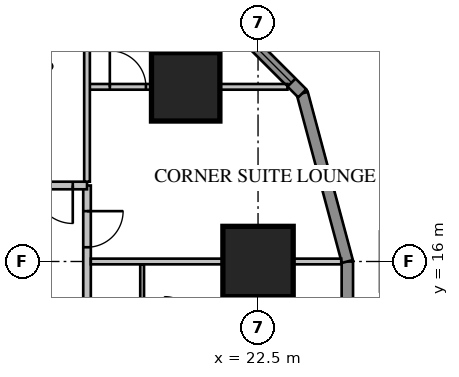
"""IFC4 building model, lengths in metres.
Left out: names, types, materials, properties, quantities, classifications, styles, units other than length and angle.
Written with IfcOpenShell. Run it as: python <this file> out.ifc"""

import sys

from ifc_helpers import new_model, si_unit, direction, frame, frame_2d, origin, origin_2d, place, context, subcontext, project, spatial, rectangle, extrude, element, fill, save


model = new_model("IFC4")
c1 = context("Model", 3, precision=1e-05, world=origin(), true_north=direction((0.0, 1.0)))
c2 = subcontext(c1, "Body", "Model", "MODEL_VIEW")
j1 = project(units=[si_unit("LENGTHUNIT", "METRE"), si_unit("PLANEANGLEUNIT", "RADIAN")], contexts=[c1])
p1 = place(None, origin())
s1 = spatial("IfcSite", under=j1, at=p1, CompositionType="ELEMENT")
p2 = place(p1, origin())
s2 = spatial("IfcBuilding", under=s1, at=p2, CompositionType="ELEMENT")
p3 = place(p2, frame((0.0, 0.0, 50.65)))
s3 = spatial("IfcBuildingStorey", under=s2, at=p3, CompositionType="ELEMENT", Elevation=50.65)
p4 = place(p3, frame((22.5, 16.0, 0.0), z_axis=(0.0, 0.0, 1.0), x_axis=(1.0, 0.0, 0.0)))
e1 = element("IfcColumn", 1, at=p4, inside=s3, PredefinedType="COLUMN", context=c2, shape_type="SweptSolid", body=[
    extrude(rectangle(XDim=1.85, YDim=1.85, at=origin_2d()), origin(), (0.0, 0.0, 1.0), 3.413),
])
p5 = place(p3, frame((20.596, 20.596, 0.0), z_axis=(0.0, 0.0, 1.0), x_axis=(1.0, 0.0, 0.0)))
e2 = element("IfcColumn", 2, at=p5, inside=s3, PredefinedType="COLUMN", context=c2, shape_type="SweptSolid", body=[
    extrude(rectangle(XDim=1.8, YDim=1.8, at=origin_2d()), origin(), (0.0, 0.0, 1.0), 3.413),
])
p6 = place(p3, frame((24.85, -16.0, 0.0), z_axis=(0.0, 0.0, 1.0), x_axis=(0.0, 1.0, 0.0)))
e3 = element("IfcWall", 3, at=p6, inside=s3, PredefinedType="SOLIDWALL", context=c2, shape_type="SweptSolid", body=[
    extrude(rectangle(XDim=32.0, YDim=0.3, at=frame_2d((16.0, 0.0))), origin(), (0.0, 0.0, 1.0), 3.65),
])
p7 = place(p6, frame((1.2, 0.0, 0.75)))
e4 = element("IfcOpeningElement", 4, at=p7, cuts=e3, PredefinedType="OPENING", context=c2, shape_type="SweptSolid", body=[
    extrude(rectangle(XDim=1.6, YDim=1.8, at=frame_2d((0.8, 0.9))), frame((0.0, 0.17, 0.0), z_axis=(0.0, -1.0, 0.0), x_axis=(1.0, 0.0, 0.0)), (0.0, 0.0, 1.0), 0.34),
])
p8 = place(p6, frame((5.2, 0.0, 0.75)))
e5 = element("IfcOpeningElement", 5, at=p8, cuts=e3, PredefinedType="OPENING", context=c2, shape_type="SweptSolid", body=[
    extrude(rectangle(XDim=1.6, YDim=1.8, at=frame_2d((0.8, 0.9))), frame((0.0, 0.17, 0.0), z_axis=(0.0, -1.0, 0.0), x_axis=(1.0, 0.0, 0.0)), (0.0, 0.0, 1.0), 0.34),
])
p9 = place(p6, frame((17.2, 0.0, 0.75)))
e6 = element("IfcOpeningElement", 6, at=p9, cuts=e3, PredefinedType="OPENING", context=c2, shape_type="SweptSolid", body=[
    extrude(rectangle(XDim=1.6, YDim=1.8, at=frame_2d((0.8, 0.9))), frame((0.0, 0.17, 0.0), z_axis=(0.0, -1.0, 0.0), x_axis=(1.0, 0.0, 0.0)), (0.0, 0.0, 1.0), 0.34),
])
p10 = place(p6, frame((21.2, 0.0, 0.75)))
e7 = element("IfcOpeningElement", 7, at=p10, cuts=e3, PredefinedType="OPENING", context=c2, shape_type="SweptSolid", body=[
    extrude(rectangle(XDim=1.6, YDim=1.8, at=frame_2d((0.8, 0.9))), frame((0.0, 0.17, 0.0), z_axis=(0.0, -1.0, 0.0), x_axis=(1.0, 0.0, 0.0)), (0.0, 0.0, 1.0), 0.34),
])
p11 = place(p6, frame((25.2, 0.0, 0.75)))
e8 = element("IfcOpeningElement", 8, at=p11, cuts=e3, PredefinedType="OPENING", context=c2, shape_type="SweptSolid", body=[
    extrude(rectangle(XDim=1.6, YDim=1.8, at=frame_2d((0.8, 0.9))), frame((0.0, 0.17, 0.0), z_axis=(0.0, -1.0, 0.0), x_axis=(1.0, 0.0, 0.0)), (0.0, 0.0, 1.0), 0.34),
])
p12 = place(p6, frame((29.2, 0.0, 0.75)))
e9 = element("IfcOpeningElement", 9, at=p12, cuts=e3, PredefinedType="OPENING", context=c2, shape_type="SweptSolid", body=[
    extrude(rectangle(XDim=1.6, YDim=1.8, at=frame_2d((0.8, 0.9))), frame((0.0, 0.17, 0.0), z_axis=(0.0, -1.0, 0.0), x_axis=(1.0, 0.0, 0.0)), (0.0, 0.0, 1.0), 0.34),
])
p13 = place(p6, frame((8.8, 0.0, 0.75)))
e10 = element("IfcOpeningElement", 10, at=p13, cuts=e3, PredefinedType="OPENING", context=c2, shape_type="SweptSolid", body=[
    extrude(rectangle(XDim=2.4, YDim=1.8, at=frame_2d((1.2, 0.9))), frame((0.0, 0.17, 0.0), z_axis=(0.0, -1.0, 0.0), x_axis=(1.0, 0.0, 0.0)), (0.0, 0.0, 1.0), 0.34),
])
p14 = place(p6, frame((13.812, 0.0, 0.0)))
e11 = element("IfcOpeningElement", 11, at=p14, cuts=e3, PredefinedType="OPENING", context=c2, shape_type="SweptSolid", body=[
    extrude(rectangle(XDim=1.0, YDim=2.4, at=frame_2d((0.5, 1.2))), frame((0.0, 0.17, 0.0), z_axis=(0.0, -1.0, 0.0), x_axis=(1.0, 0.0, 0.0)), (0.0, 0.0, 1.0), 0.34),
])
p15 = place(p3, frame((24.85, 16.0, 0.0), z_axis=(0.0, 0.0, 1.0), x_axis=(-0.258839972501, 0.965920218567, 0.0)))
e12 = element("IfcWall", 12, at=p15, inside=s3, PredefinedType="SOLIDWALL", context=c2, shape_type="SweptSolid", body=[
    extrude(rectangle(XDim=4.581, YDim=0.3, at=frame_2d((2.291, 0.0))), origin(), (0.0, 0.0, 1.0), 3.65),
])
p16 = place(p3, frame((23.664, 20.425, 0.0), z_axis=(0.0, 0.0, 1.0), x_axis=(-0.707106781187, 0.707106781187, 0.0)))
e13 = element("IfcWall", 13, at=p16, inside=s3, PredefinedType="SOLIDWALL", context=c2, shape_type="SweptSolid", body=[
    extrude(rectangle(XDim=4.581, YDim=0.3, at=frame_2d((2.291, 0.0))), origin(), (0.0, 0.0, 1.0), 3.65),
])
p17 = place(p16, frame((0.4, 0.0, 0.75)))
e14 = element("IfcOpeningElement", 14, at=p17, cuts=e13, PredefinedType="OPENING", context=c2, shape_type="SweptSolid", body=[
    extrude(rectangle(XDim=3.781, YDim=1.8, at=frame_2d((1.891, 0.9))), frame((0.0, 0.17, 0.0), z_axis=(0.0, -1.0, 0.0), x_axis=(1.0, 0.0, 0.0)), (0.0, 0.0, 1.0), 0.34),
])
p18 = place(p3, frame((18.0, -18.0, 0.0), z_axis=(0.0, 0.0, 1.0), x_axis=(0.0, 1.0, 0.0)))
e15 = element("IfcWall", 15, at=p18, inside=s3, PredefinedType="PARTITIONING", context=c2, shape_type="SweptSolid", body=[
    extrude(rectangle(XDim=36.0, YDim=0.2, at=frame_2d((18.0, 0.0))), origin(), (0.0, 0.0, 1.0), 3.65),
])
p19 = place(p18, frame((10.4, 0.0, 0.0)))
e16 = element("IfcOpeningElement", 16, at=p19, cuts=e15, PredefinedType="OPENING", context=c2, shape_type="SweptSolid", body=[
    extrude(rectangle(XDim=1.0, YDim=2.1, at=frame_2d((0.5, 1.05))), frame((0.0, 0.12, 0.0), z_axis=(0.0, -1.0, 0.0), x_axis=(1.0, 0.0, 0.0)), (0.0, 0.0, 1.0), 0.24),
])
p20 = place(p18, frame((14.4, 0.0, 0.0)))
e17 = element("IfcOpeningElement", 17, at=p20, cuts=e15, PredefinedType="OPENING", context=c2, shape_type="SweptSolid", body=[
    extrude(rectangle(XDim=1.0, YDim=2.1, at=frame_2d((0.5, 1.05))), frame((0.0, 0.12, 0.0), z_axis=(0.0, -1.0, 0.0), x_axis=(1.0, 0.0, 0.0)), (0.0, 0.0, 1.0), 0.24),
])
p21 = place(p18, frame((0.375, 0.0, 0.0)))
e18 = element("IfcOpeningElement", 18, at=p21, cuts=e15, PredefinedType="OPENING", context=c2, shape_type="SweptSolid", body=[
    extrude(rectangle(XDim=1.0, YDim=2.1, at=frame_2d((0.5, 1.05))), frame((0.0, 0.12, 0.0), z_axis=(0.0, -1.0, 0.0), x_axis=(1.0, 0.0, 0.0)), (0.0, 0.0, 1.0), 0.24),
])
p22 = place(p18, frame((34.375, 0.0, 0.0)))
e19 = element("IfcOpeningElement", 19, at=p22, cuts=e15, PredefinedType="OPENING", context=c2, shape_type="SweptSolid", body=[
    extrude(rectangle(XDim=0.95, YDim=2.1, at=frame_2d((0.475, 1.05))), frame((0.0, 0.12, 0.0), z_axis=(0.0, -1.0, 0.0), x_axis=(1.0, 0.0, 0.0)), (0.0, 0.0, 1.0), 0.24),
])
p23 = place(p3, frame((19.45, -3.925, 0.0), z_axis=(0.0, 0.0, 1.0), x_axis=(0.0, 1.0, 0.0)))
e20 = element("IfcWall", 20, at=p23, inside=s3, PredefinedType="PARTITIONING", context=c2, shape_type="SweptSolid", body=[
    extrude(rectangle(XDim=19.85, YDim=0.1, at=frame_2d((9.925, 0.0))), origin(), (0.0, 0.0, 1.0), 3.65),
])
p24 = place(p23, frame((2.125, 0.0, 0.0)))
e21 = element("IfcOpeningElement", 21, at=p24, cuts=e20, PredefinedType="OPENING", context=c2, shape_type="SweptSolid", body=[
    extrude(rectangle(XDim=1.0, YDim=2.1, at=frame_2d((0.5, 1.05))), frame((0.0, 0.07, 0.0), z_axis=(0.0, -1.0, 0.0), x_axis=(1.0, 0.0, 0.0)), (0.0, 0.0, 1.0), 0.14),
])
p25 = place(p23, frame((0.3, 0.0, 0.0)))
e22 = element("IfcOpeningElement", 22, at=p25, cuts=e20, PredefinedType="OPENING", context=c2, shape_type="SweptSolid", body=[
    extrude(rectangle(XDim=0.8, YDim=2.1, at=frame_2d((0.4, 1.05))), frame((0.0, 0.07, 0.0), z_axis=(0.0, -1.0, 0.0), x_axis=(1.0, 0.0, 0.0)), (0.0, 0.0, 1.0), 0.14),
])
p26 = place(p23, frame((4.3, 0.0, 0.0)))
e23 = element("IfcOpeningElement", 23, at=p26, cuts=e20, PredefinedType="OPENING", context=c2, shape_type="SweptSolid", body=[
    extrude(rectangle(XDim=0.95, YDim=2.1, at=frame_2d((0.475, 1.05))), frame((0.0, 0.07, 0.0), z_axis=(0.0, -1.0, 0.0), x_axis=(1.0, 0.0, 0.0)), (0.0, 0.0, 1.0), 0.14),
])
p27 = place(p23, frame((8.3, 0.0, 0.0)))
e24 = element("IfcOpeningElement", 24, at=p27, cuts=e20, PredefinedType="OPENING", context=c2, shape_type="SweptSolid", body=[
    extrude(rectangle(XDim=0.95, YDim=2.1, at=frame_2d((0.475, 1.05))), frame((0.0, 0.07, 0.0), z_axis=(0.0, -1.0, 0.0), x_axis=(1.0, 0.0, 0.0)), (0.0, 0.0, 1.0), 0.14),
])
p28 = place(p23, frame((12.3, 0.0, 0.0)))
e25 = element("IfcOpeningElement", 25, at=p28, cuts=e20, PredefinedType="OPENING", context=c2, shape_type="SweptSolid", body=[
    extrude(rectangle(XDim=0.95, YDim=2.1, at=frame_2d((0.475, 1.05))), frame((0.0, 0.07, 0.0), z_axis=(0.0, -1.0, 0.0), x_axis=(1.0, 0.0, 0.0)), (0.0, 0.0, 1.0), 0.14),
])
p29 = place(p23, frame((16.3, 0.0, 0.0)))
e26 = element("IfcOpeningElement", 26, at=p29, cuts=e20, PredefinedType="OPENING", context=c2, shape_type="SweptSolid", body=[
    extrude(rectangle(XDim=0.95, YDim=2.1, at=frame_2d((0.475, 1.05))), frame((0.0, 0.07, 0.0), z_axis=(0.0, -1.0, 0.0), x_axis=(1.0, 0.0, 0.0)), (0.0, 0.0, 1.0), 0.14),
])
p30 = place(p3, frame((18.1, 16.0, 0.0), z_axis=(0.0, 0.0, 1.0), x_axis=(1.0, 0.0, 0.0)))
e27 = element("IfcWall", 27, at=p30, inside=s3, PredefinedType="PARTITIONING", context=c2, shape_type="SweptSolid", body=[
    extrude(rectangle(XDim=6.589, YDim=0.15, at=frame_2d((3.295, 0.0))), origin(), (0.0, 0.0, 1.0), 3.65),
])
p31 = place(p3, frame((21.95, 14.325, 0.0), z_axis=(0.0, 0.0, 1.0), x_axis=(0.0, 1.0, 0.0)))
e28 = element("IfcWall", 28, at=p31, inside=s3, PredefinedType="PARTITIONING", context=c2, shape_type="SweptSolid", body=[
    extrude(rectangle(XDim=1.6, YDim=0.1, at=frame_2d((0.8, 0.0))), origin(), (0.0, 0.0, 1.0), 3.65),
])
p32 = place(p3, frame((18.065, 20.596, 0.0), z_axis=(0.0, 0.0, 1.0), x_axis=(1.0, 0.0, 0.0)))
e29 = element("IfcWall", 29, at=p32, inside=s3, PredefinedType="PARTITIONING", context=c2, shape_type="SweptSolid", body=[
    extrude(rectangle(XDim=5.209, YDim=0.15, at=frame_2d((2.604, 0.0))), origin(), (0.0, 0.0, 1.0), 3.65),
])
p33 = place(p32, frame((0.535, 0.0, 0.0)))
e30 = element("IfcOpeningElement", 30, at=p33, cuts=e29, PredefinedType="OPENING", context=c2, shape_type="SweptSolid", body=[
    extrude(rectangle(XDim=0.95, YDim=2.1, at=frame_2d((0.475, 1.05))), frame((0.0, 0.095, 0.0), z_axis=(0.0, -1.0, 0.0), x_axis=(1.0, 0.0, 0.0)), (0.0, 0.0, 1.0), 0.19),
])
p34 = place(p3, frame((18.0, 18.0, 0.0), z_axis=(0.0, 0.0, 1.0), x_axis=(-1.0, 0.0, 0.0)))
e31 = element("IfcWall", 31, at=p34, inside=s3, PredefinedType="PARTITIONING", context=c2, shape_type="SweptSolid", body=[
    extrude(rectangle(XDim=36.0, YDim=0.2, at=frame_2d((18.0, 0.0))), origin(), (0.0, 0.0, 1.0), 3.65),
])
p35 = place(p34, frame((0.375, 0.0, 0.0)))
e32 = element("IfcOpeningElement", 32, at=p35, cuts=e31, PredefinedType="OPENING", context=c2, shape_type="SweptSolid", body=[
    extrude(rectangle(XDim=1.0, YDim=2.1, at=frame_2d((0.5, 1.05))), frame((0.0, 0.12, 0.0), z_axis=(0.0, -1.0, 0.0), x_axis=(1.0, 0.0, 0.0)), (0.0, 0.0, 1.0), 0.24),
])
p36 = place(p34, frame((3.95, 0.0, 0.0)))
e33 = element("IfcOpeningElement", 33, at=p36, cuts=e31, PredefinedType="OPENING", context=c2, shape_type="SweptSolid", body=[
    extrude(rectangle(XDim=0.95, YDim=2.1, at=frame_2d((0.475, 1.05))), frame((0.0, 0.12, 0.0), z_axis=(0.0, -1.0, 0.0), x_axis=(1.0, 0.0, 0.0)), (0.0, 0.0, 1.0), 0.24),
])
p37 = place(p34, frame((7.95, 0.0, 0.0)))
e34 = element("IfcOpeningElement", 34, at=p37, cuts=e31, PredefinedType="OPENING", context=c2, shape_type="SweptSolid", body=[
    extrude(rectangle(XDim=0.95, YDim=2.1, at=frame_2d((0.475, 1.05))), frame((0.0, 0.12, 0.0), z_axis=(0.0, -1.0, 0.0), x_axis=(1.0, 0.0, 0.0)), (0.0, 0.0, 1.0), 0.24),
])
p38 = place(p34, frame((19.95, 0.0, 0.0)))
e35 = element("IfcOpeningElement", 35, at=p38, cuts=e31, PredefinedType="OPENING", context=c2, shape_type="SweptSolid", body=[
    extrude(rectangle(XDim=0.95, YDim=2.1, at=frame_2d((0.475, 1.05))), frame((0.0, 0.12, 0.0), z_axis=(0.0, -1.0, 0.0), x_axis=(1.0, 0.0, 0.0)), (0.0, 0.0, 1.0), 0.24),
])
p39 = place(p34, frame((23.95, 0.0, 0.0)))
e36 = element("IfcOpeningElement", 36, at=p39, cuts=e31, PredefinedType="OPENING", context=c2, shape_type="SweptSolid", body=[
    extrude(rectangle(XDim=0.95, YDim=2.1, at=frame_2d((0.475, 1.05))), frame((0.0, 0.12, 0.0), z_axis=(0.0, -1.0, 0.0), x_axis=(1.0, 0.0, 0.0)), (0.0, 0.0, 1.0), 0.24),
])
p40 = place(p34, frame((27.95, 0.0, 0.0)))
e37 = element("IfcOpeningElement", 37, at=p40, cuts=e31, PredefinedType="OPENING", context=c2, shape_type="SweptSolid", body=[
    extrude(rectangle(XDim=0.95, YDim=2.1, at=frame_2d((0.475, 1.05))), frame((0.0, 0.12, 0.0), z_axis=(0.0, -1.0, 0.0), x_axis=(1.0, 0.0, 0.0)), (0.0, 0.0, 1.0), 0.24),
])
p41 = place(p34, frame((31.95, 0.0, 0.0)))
e38 = element("IfcOpeningElement", 38, at=p41, cuts=e31, PredefinedType="OPENING", context=c2, shape_type="SweptSolid", body=[
    extrude(rectangle(XDim=0.95, YDim=2.1, at=frame_2d((0.475, 1.05))), frame((0.0, 0.12, 0.0), z_axis=(0.0, -1.0, 0.0), x_axis=(1.0, 0.0, 0.0)), (0.0, 0.0, 1.0), 0.24),
])
p42 = place(p34, frame((34.375, 0.0, 0.0)))
e39 = element("IfcOpeningElement", 39, at=p42, cuts=e31, PredefinedType="OPENING", context=c2, shape_type="SweptSolid", body=[
    extrude(rectangle(XDim=0.95, YDim=2.1, at=frame_2d((0.475, 1.05))), frame((0.0, 0.12, 0.0), z_axis=(0.0, -1.0, 0.0), x_axis=(1.0, 0.0, 0.0)), (0.0, 0.0, 1.0), 0.24),
])
p43 = place(p34, frame((11.2, 0.0, 0.0)))
e40 = element("IfcOpeningElement", 40, at=p43, cuts=e31, PredefinedType="OPENING", context=c2, shape_type="SweptSolid", body=[
    extrude(rectangle(XDim=1.0, YDim=2.1, at=frame_2d((0.5, 1.05))), frame((0.0, 0.12, 0.0), z_axis=(0.0, -1.0, 0.0), x_axis=(1.0, 0.0, 0.0)), (0.0, 0.0, 1.0), 0.24),
])
p44 = place(p34, frame((15.2, 0.0, 0.0)))
e41 = element("IfcOpeningElement", 41, at=p44, cuts=e31, PredefinedType="OPENING", context=c2, shape_type="SweptSolid", body=[
    extrude(rectangle(XDim=1.0, YDim=2.1, at=frame_2d((0.5, 1.05))), frame((0.0, 0.12, 0.0), z_axis=(0.0, -1.0, 0.0), x_axis=(1.0, 0.0, 0.0)), (0.0, 0.0, 1.0), 0.24),
])
p45 = place(p3, frame((18.0, 18.1, 0.0), z_axis=(0.0, 0.0, 1.0), x_axis=(0.0, 1.0, 0.0)))
e42 = element("IfcWall", 42, at=p45, inside=s3, PredefinedType="PARTITIONING", context=c2, shape_type="SweptSolid", body=[
    extrude(rectangle(XDim=6.053, YDim=0.15, at=frame_2d((3.027, 0.0))), origin(), (0.0, 0.0, 1.0), 3.65),
])
p46 = place(p17, origin())
e43 = element("IfcWindow", 43, at=p46, inside=s3, PartitioningType="SINGLE_PANEL", PredefinedType="WINDOW", context=c2, shape_type="SweptSolid", body=[
    extrude(rectangle(XDim=3.781, YDim=1.8, at=frame_2d((1.891, 0.9))), frame((0.0, 0.03, 0.0), z_axis=(0.0, -1.0, 0.0), x_axis=(1.0, 0.0, 0.0)), (0.0, 0.0, 1.0), 0.06),
])
fill(e14, e43)
p47 = place(p22, origin())
e44 = element("IfcDoor", 44, at=p47, inside=s3, OperationType="SINGLE_SWING_RIGHT", PredefinedType="DOOR", context=c2, shape_type="SweptSolid", body=[
    extrude(rectangle(XDim=0.95, YDim=2.1, at=frame_2d((0.475, 1.05))), frame((0.0, 0.025, 0.0), z_axis=(0.0, -1.0, 0.0), x_axis=(1.0, 0.0, 0.0)), (0.0, 0.0, 1.0), 0.05),
])
fill(e19, e44)
p48 = place(p33, origin())
e45 = element("IfcDoor", 45, at=p48, inside=s3, OperationType="SINGLE_SWING_LEFT", PredefinedType="DOOR", context=c2, shape_type="SweptSolid", body=[
    extrude(rectangle(XDim=0.95, YDim=2.1, at=frame_2d((0.475, 1.05))), frame((0.0, 0.025, 0.0), z_axis=(0.0, -1.0, 0.0), x_axis=(1.0, 0.0, 0.0)), (0.0, 0.0, 1.0), 0.05),
])
fill(e30, e45)
p49 = place(p35, origin())
e46 = element("IfcDoor", 46, at=p49, inside=s3, OperationType="SINGLE_SWING_LEFT", PredefinedType="DOOR", context=c2, shape_type="SweptSolid", body=[
    extrude(rectangle(XDim=1.0, YDim=2.1, at=frame_2d((0.5, 1.05))), frame((0.0, 0.025, 0.0), z_axis=(0.0, -1.0, 0.0), x_axis=(1.0, 0.0, 0.0)), (0.0, 0.0, 1.0), 0.05),
])
fill(e32, e46)
save(model, sys.argv[1])
